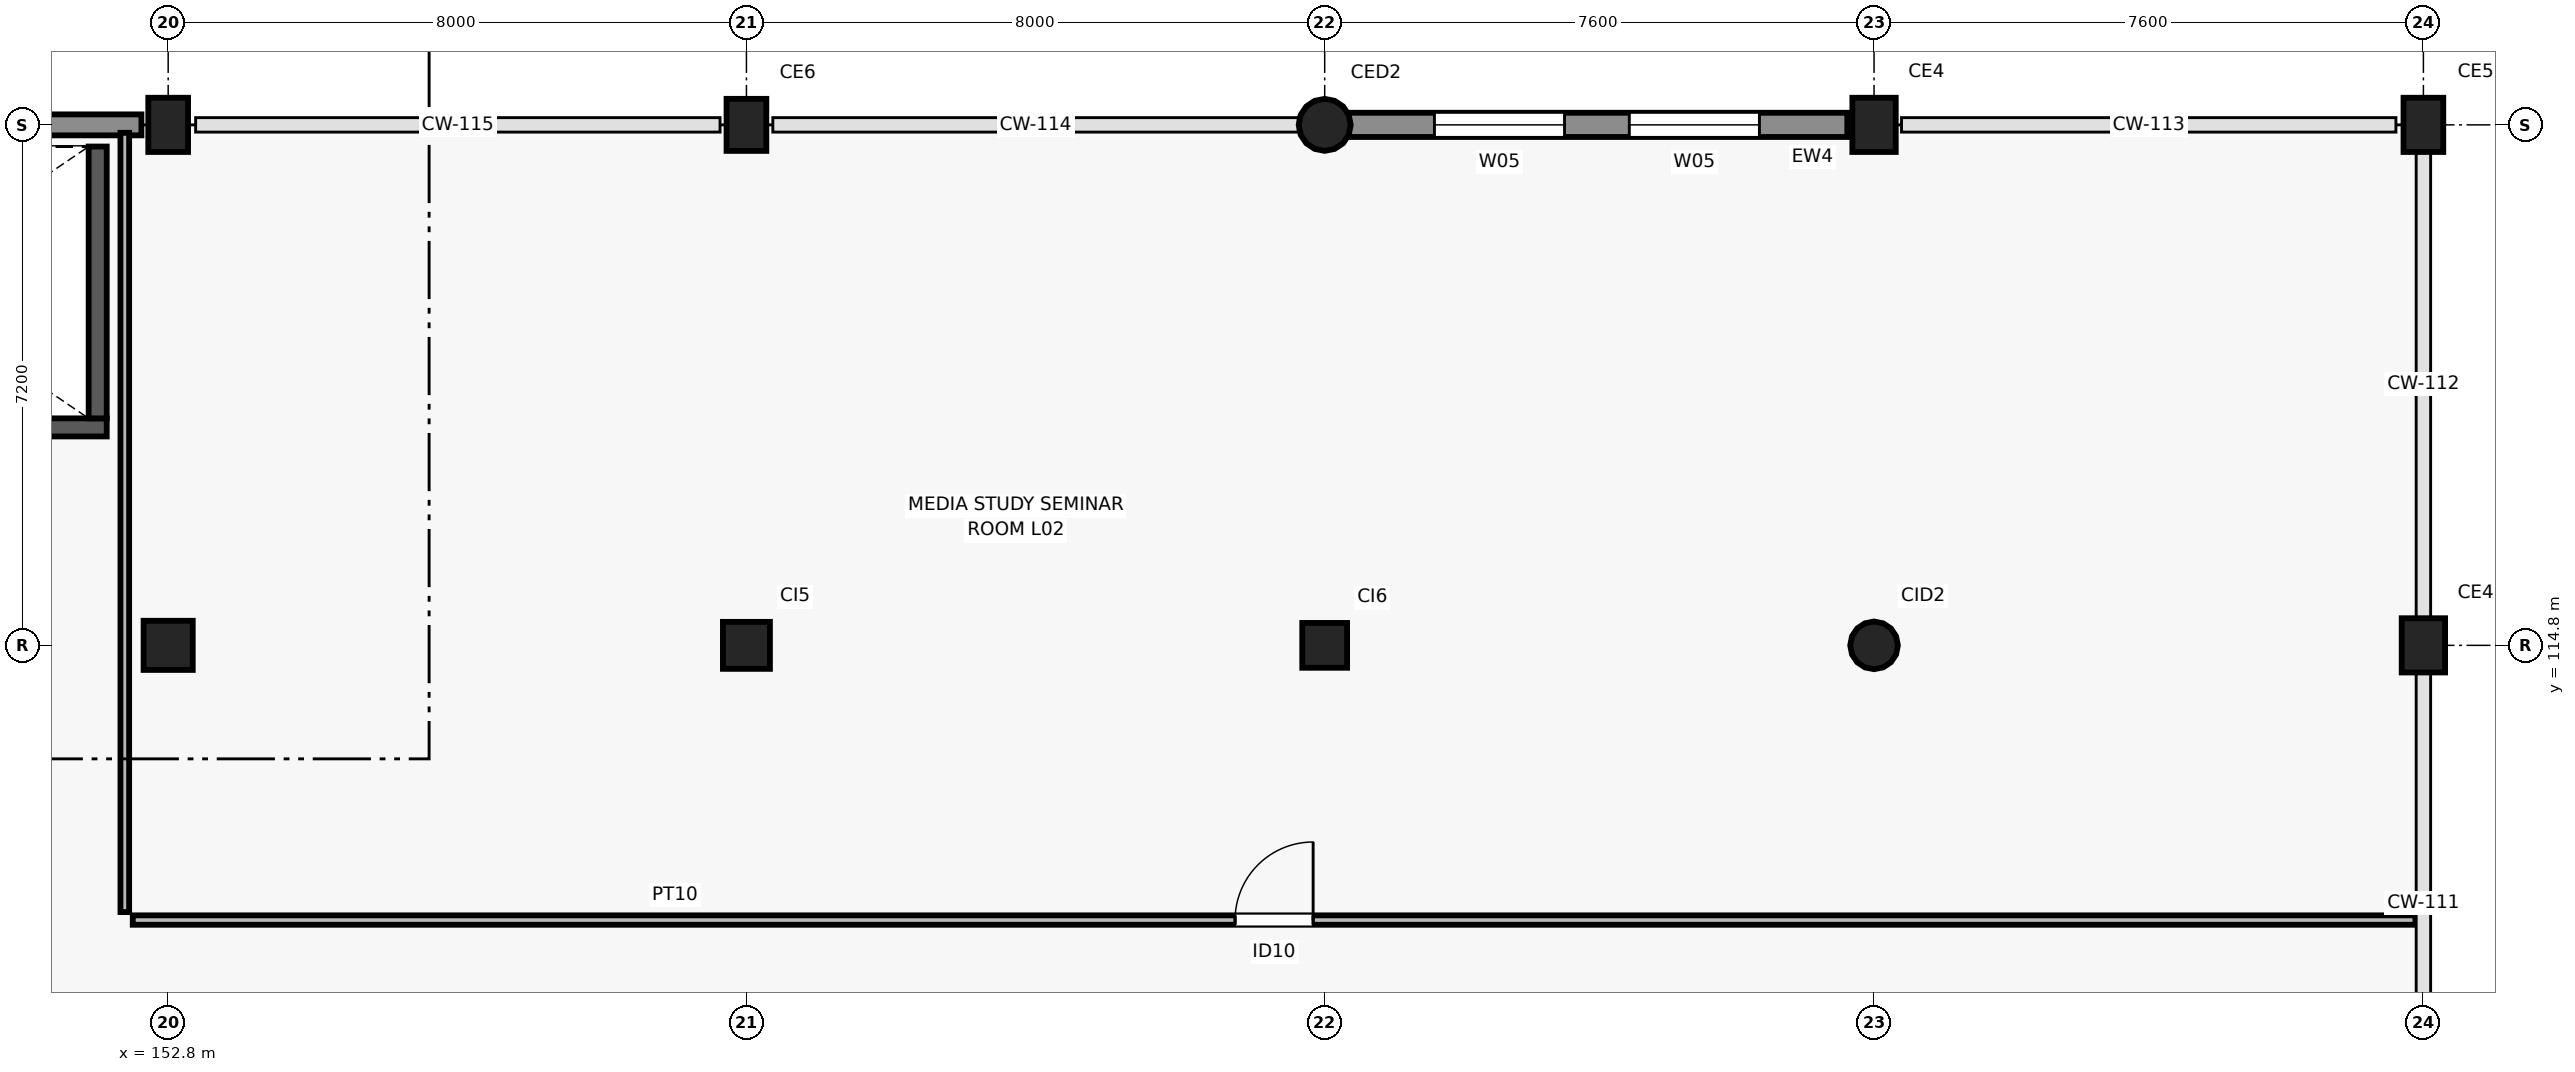
"""IFC4 building model, lengths in metres.
Left out: names, types, materials, properties, quantities, classifications, styles, units other than length and angle.
Written with IfcOpenShell. Run it as: python <this file> out.ifc"""

import sys

from ifc_helpers import new_model, si_unit, direction, frame, frame_2d, origin, origin_2d, place, context, subcontext, project, spatial, rectangle, circle, extrude, element, fill, save


model = new_model("IFC4")
c1 = context("Model", 3, precision=1e-05, world=origin(), true_north=direction((0.0, 1.0)))
c2 = subcontext(c1, "Body", "Model", "MODEL_VIEW")
j1 = project(units=[si_unit("LENGTHUNIT", "METRE"), si_unit("PLANEANGLEUNIT", "RADIAN")], contexts=[c1])
p1 = place(None, origin())
s1 = spatial("IfcSite", under=j1, at=p1, CompositionType="ELEMENT")
p2 = place(p1, origin())
s2 = spatial("IfcBuilding", under=s1, at=p2, CompositionType="ELEMENT")
p3 = place(p2, frame((0.0, 0.0, 9.0)))
s3 = spatial("IfcBuildingStorey", under=s2, at=p3, CompositionType="ELEMENT", Elevation=9.0)
p4 = place(p3, frame((152.8, 114.8, 0.0), z_axis=(0.0, 0.0, 1.0), x_axis=(1.0, 0.0, 0.0)))
e1 = element("IfcColumn", 1, at=p4, inside=s3, PredefinedType="COLUMN", context=c2, shape_type="SweptSolid", body=[
    extrude(rectangle(XDim=0.68, YDim=0.68, at=origin_2d()), origin(), (0.0, 0.0, 1.0), 4.2),
])
p5 = place(p3, frame((152.8, 122.0, 0.0), z_axis=(0.0, 0.0, 1.0), x_axis=(1.0, 0.0, 0.0)))
e2 = element("IfcColumn", 2, at=p5, inside=s3, PredefinedType="COLUMN", context=c2, shape_type="SweptSolid", body=[
    extrude(rectangle(XDim=0.75, YDim=0.55, at=origin_2d()), origin(), (0.0, 0.0, 1.0), 4.2),
])
p6 = place(p3, frame((160.8, 114.8, 0.0), z_axis=(0.0, 0.0, 1.0), x_axis=(1.0, 0.0, 0.0)))
e3 = element("IfcColumn", 3, at=p6, inside=s3, PredefinedType="COLUMN", context=c2, shape_type="SweptSolid", body=[
    extrude(rectangle(XDim=0.65, YDim=0.65, at=origin_2d()), origin(), (0.0, 0.0, 1.0), 4.2),
])
p7 = place(p3, frame((160.8, 122.0, 0.0), z_axis=(0.0, 0.0, 1.0), x_axis=(1.0, 0.0, 0.0)))
e4 = element("IfcColumn", 4, at=p7, inside=s3, PredefinedType="COLUMN", context=c2, shape_type="SweptSolid", body=[
    extrude(rectangle(XDim=0.72, YDim=0.55, at=origin_2d()), origin(), (0.0, 0.0, 1.0), 4.2),
])
p8 = place(p3, frame((168.8, 114.8, 0.0), z_axis=(0.0, 0.0, 1.0), x_axis=(1.0, 0.0, 0.0)))
e5 = element("IfcColumn", 5, at=p8, inside=s3, PredefinedType="COLUMN", context=c2, shape_type="SweptSolid", body=[
    extrude(rectangle(XDim=0.62, YDim=0.62, at=origin_2d()), origin(), (0.0, 0.0, 1.0), 4.2),
])
p9 = place(p3, frame((168.8, 122.0, 0.0), z_axis=(0.0, 0.0, 1.0), x_axis=(1.0, 0.0, 0.0)))
e6 = element("IfcColumn", 6, at=p9, inside=s3, PredefinedType="COLUMN", context=c2, shape_type="SweptSolid", body=[
    extrude(circle(Radius=0.36, at=origin_2d()), origin(), (0.0, 0.0, 1.0), 4.2),
])
p10 = place(p3, frame((176.4, 114.8, 0.0), z_axis=(0.0, 0.0, 1.0), x_axis=(1.0, 0.0, 0.0)))
e7 = element("IfcColumn", 7, at=p10, inside=s3, PredefinedType="COLUMN", context=c2, shape_type="SweptSolid", body=[
    extrude(circle(Radius=0.33, at=origin_2d()), origin(), (0.0, 0.0, 1.0), 4.2),
])
for number, where, z_axis, x_axis in (
    (8, (176.4, 122.0, 0.0), (0.0, 0.0, 1.0), (1.0, 0.0, 0.0)),
    (9, (184.0, 114.8, 0.0), (0.0, 0.0, 1.0), (1.0, 0.0, 0.0)),
):
    element("IfcColumn", number, at=place(p3, frame(where, z_axis=z_axis, x_axis=x_axis)), inside=s3, PredefinedType="COLUMN", context=c2, shape_type="SweptSolid", body=[
        extrude(rectangle(XDim=0.75, YDim=0.6, at=origin_2d()), origin(), (0.0, 0.0, 1.0), 4.2),
    ])
p11 = place(p3, frame((184.0, 122.0, 0.0), z_axis=(0.0, 0.0, 1.0), x_axis=(1.0, 0.0, 0.0)))
e10 = element("IfcColumn", 10, at=p11, inside=s3, PredefinedType="COLUMN", context=c2, shape_type="SweptSolid", body=[
    extrude(rectangle(XDim=0.75, YDim=0.55, at=origin_2d()), origin(), (0.0, 0.0, 1.0), 4.2),
])
p12 = place(p3, frame((176.03, 122.0, 0.0), z_axis=(0.0, 0.0, 1.0), x_axis=(-1.0, 0.0, 0.0)))
e11 = element("IfcWall", 11, at=p12, inside=s3, PredefinedType="SOLIDWALL", context=c2, shape_type="SweptSolid", body=[
    extrude(rectangle(XDim=6.928, YDim=0.335, at=frame_2d((3.464, 0.0))), origin(), (0.0, 0.0, 1.0), 3.27),
])
p13 = place(p12, frame((1.216, 0.0, 0.9)))
e12 = element("IfcOpeningElement", 12, at=p13, cuts=e11, PredefinedType="OPENING", context=c2, shape_type="SweptSolid", body=[
    extrude(rectangle(XDim=1.8, YDim=1.8, at=frame_2d((0.9, 0.9))), frame((0.0, 0.177, 0.0), z_axis=(0.0, -1.0, 0.0), x_axis=(1.0, 0.0, 0.0)), (0.0, 0.0, 1.0), 0.355),
])
p14 = place(p12, frame((3.912, 0.0, 0.9)))
e13 = element("IfcOpeningElement", 13, at=p14, cuts=e11, PredefinedType="OPENING", context=c2, shape_type="SweptSolid", body=[
    extrude(rectangle(XDim=1.8, YDim=1.8, at=frame_2d((0.9, 0.9))), frame((0.0, 0.177, 0.0), z_axis=(0.0, -1.0, 0.0), x_axis=(1.0, 0.0, 0.0)), (0.0, 0.0, 1.0), 0.355),
])
p15 = place(p3, frame((152.43, 122.0, 0.0), z_axis=(0.0, 0.0, 1.0), x_axis=(-1.0, 0.0, 0.0)))
e14 = element("IfcWall", 14, at=p15, inside=s3, PredefinedType="SOLIDWALL", context=c2, shape_type="SweptSolid", body=[
    extrude(rectangle(XDim=7.26, YDim=0.29, at=frame_2d((3.63, 0.0))), origin(), (0.0, 0.0, 1.0), 3.92),
])
p16 = place(p3, frame((144.05, 117.815, 0.0), z_axis=(0.0, 0.0, 1.0), x_axis=(1.0, 0.0, 0.0)))
e15 = element("IfcWall", 15, at=p16, inside=s3, PredefinedType="SHEAR", context=c2, shape_type="SweptSolid", body=[
    extrude(rectangle(XDim=7.9, YDim=0.25, at=frame_2d((3.95, 0.0))), origin(), (0.0, 0.0, 1.0), 3.92),
])
p17 = place(p16, frame((0.5, 0.0, 0.0)))
e16 = element("IfcOpeningElement", 16, at=p17, cuts=e15, PredefinedType="OPENING", context=c2, shape_type="SweptSolid", body=[
    extrude(rectangle(XDim=1.25, YDim=2.2, at=frame_2d((0.625, 1.1))), frame((0.0, 0.135, 0.0), z_axis=(0.0, -1.0, 0.0), x_axis=(1.0, 0.0, 0.0)), (0.0, 0.0, 1.0), 0.27),
])
p18 = place(p3, frame((151.825, 117.94, 0.0), z_axis=(0.0, 0.0, 1.0), x_axis=(0.0, 1.0, 0.0)))
e17 = element("IfcWall", 17, at=p18, inside=s3, PredefinedType="SHEAR", context=c2, shape_type="SweptSolid", body=[
    extrude(rectangle(XDim=3.76, YDim=0.25, at=frame_2d((1.88, 0.0))), origin(), (0.0, 0.0, 1.0), 3.92),
])
p19 = place(p3, frame((152.31, 111.0, 0.0), z_axis=(0.0, 0.0, 1.0), x_axis=(1.0, 0.0, 0.0)))
e18 = element("IfcWall", 18, at=p19, inside=s3, PredefinedType="PARTITIONING", context=c2, shape_type="SweptSolid", body=[
    extrude(rectangle(XDim=31.58, YDim=0.13, at=frame_2d((15.79, 0.0))), origin(), (0.0, 0.0, 1.0), 3.9),
])
p20 = place(p19, frame((15.25, 0.0, 0.0)))
e19 = element("IfcOpeningElement", 19, at=p20, cuts=e18, PredefinedType="OPENING", context=c2, shape_type="SweptSolid", body=[
    extrude(rectangle(XDim=1.08, YDim=2.15, at=frame_2d((0.54, 1.075))), frame((0.0, 0.075, 0.0), z_axis=(0.0, -1.0, 0.0), x_axis=(1.0, 0.0, 0.0)), (0.0, 0.0, 1.0), 0.15),
])
p21 = place(p3, frame((152.2, 111.11, 0.0), z_axis=(0.0, 0.0, 1.0), x_axis=(0.0, 1.0, 0.0)))
e20 = element("IfcWall", 20, at=p21, inside=s3, PredefinedType="PARTITIONING", context=c2, shape_type="SweptSolid", body=[
    extrude(rectangle(XDim=10.78, YDim=0.12, at=frame_2d((5.39, 0.0))), origin(), (0.0, 0.0, 1.0), 3.9),
])
p22 = place(p13, origin())
e21 = element("IfcWindow", 21, at=p22, inside=s3, PartitioningType="SINGLE_PANEL", PredefinedType="WINDOW", context=c2, shape_type="SweptSolid", body=[
    extrude(rectangle(XDim=1.8, YDim=1.8, at=frame_2d((0.9, 0.9))), frame((0.0, 0.03, 0.0), z_axis=(0.0, -1.0, 0.0), x_axis=(1.0, 0.0, 0.0)), (0.0, 0.0, 1.0), 0.06),
])
fill(e12, e21)
p23 = place(p14, origin())
e22 = element("IfcWindow", 22, at=p23, inside=s3, PartitioningType="SINGLE_PANEL", PredefinedType="WINDOW", context=c2, shape_type="SweptSolid", body=[
    extrude(rectangle(XDim=1.8, YDim=1.8, at=frame_2d((0.9, 0.9))), frame((0.0, 0.03, 0.0), z_axis=(0.0, -1.0, 0.0), x_axis=(1.0, 0.0, 0.0)), (0.0, 0.0, 1.0), 0.06),
])
fill(e13, e22)
p24 = place(p20, origin())
e23 = element("IfcDoor", 23, at=p24, inside=s3, OperationType="SINGLE_SWING_RIGHT", PredefinedType="DOOR", context=c2, shape_type="SweptSolid", body=[
    extrude(rectangle(XDim=1.08, YDim=2.15, at=frame_2d((0.54, 1.075))), frame((0.0, 0.025, 0.0), z_axis=(0.0, -1.0, 0.0), x_axis=(1.0, 0.0, 0.0)), (0.0, 0.0, 1.0), 0.05),
])
fill(e19, e23)
save(model, sys.argv[1])
